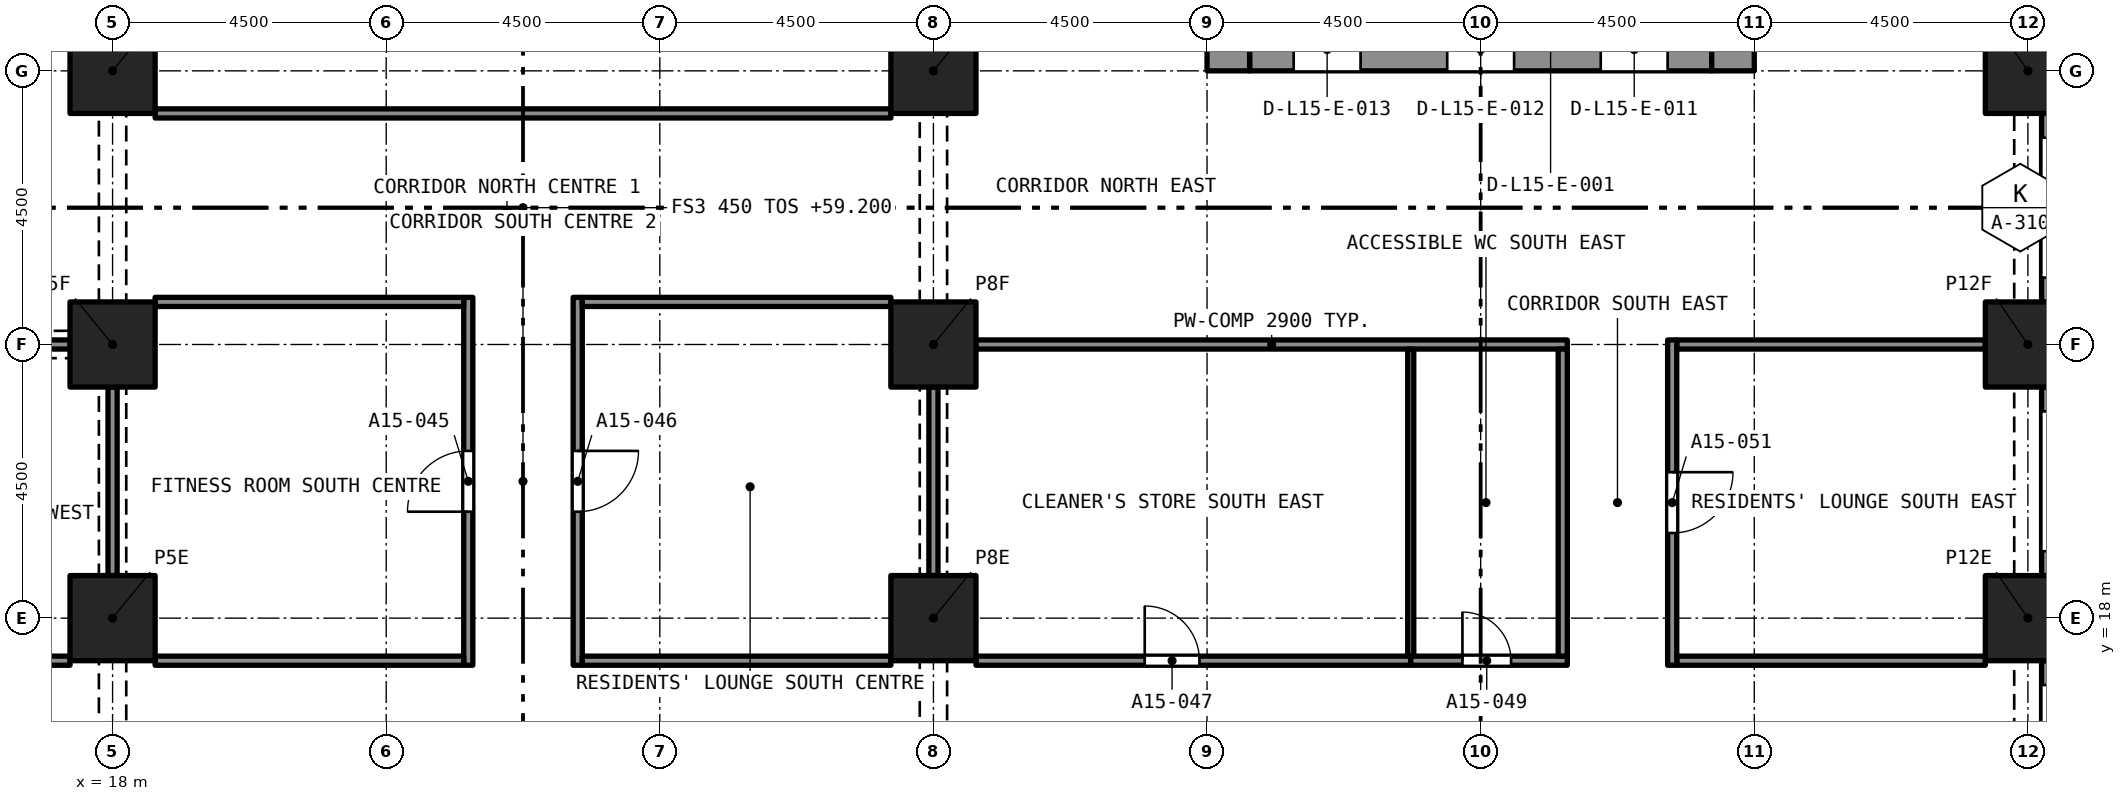
"""IFC4 building model, lengths in metres.
Left out: names, types, materials, properties, quantities, classifications, styles, units other than length and angle.
Written with IfcOpenShell. Run it as: python <this file> out.ifc"""

import sys

from ifc_helpers import new_model, si_unit, direction, frame, frame_2d, origin, origin_2d, place, context, subcontext, project, spatial, rectangle, extrude, element, fill, save


model = new_model("IFC4")
c1 = context("Model", 3, precision=1e-05, world=origin(), true_north=direction((0.0, 1.0)))
c2 = subcontext(c1, "Body", "Model", "MODEL_VIEW")
j1 = project(units=[si_unit("LENGTHUNIT", "METRE"), si_unit("PLANEANGLEUNIT", "RADIAN")], contexts=[c1])
p1 = place(None, origin())
s1 = spatial("IfcSite", under=j1, at=p1, CompositionType="ELEMENT")
p2 = place(p1, origin())
s2 = spatial("IfcBuilding", under=s1, at=p2, CompositionType="ELEMENT")
p3 = place(p2, frame((0.0, 0.0, 59.2)))
s3 = spatial("IfcBuildingStorey", under=s2, at=p3, CompositionType="ELEMENT", Elevation=59.2)
for number, where, z_axis, x_axis in (
    (1, (18.0, 18.0, 0.0), (0.0, 0.0, 1.0), (1.0, 0.0, 0.0)),
    (2, (31.5, 18.0, 0.0), (0.0, 0.0, 1.0), (1.0, 0.0, 0.0)),
    (3, (49.5, 18.0, 0.0), (0.0, 0.0, 1.0), (1.0, 0.0, 0.0)),
    (4, (18.0, 22.5, 0.0), (0.0, 0.0, 1.0), (1.0, 0.0, 0.0)),
    (5, (31.5, 22.5, 0.0), (0.0, 0.0, 1.0), (1.0, 0.0, 0.0)),
    (6, (49.5, 22.5, 0.0), (0.0, 0.0, 1.0), (1.0, 0.0, 0.0)),
    (7, (18.0, 27.0, 0.0), (0.0, 0.0, 1.0), (1.0, 0.0, 0.0)),
    (8, (31.5, 27.0, 0.0), (0.0, 0.0, 1.0), (1.0, 0.0, 0.0)),
    (9, (49.5, 27.0, 0.0), (0.0, 0.0, 1.0), (1.0, 0.0, 0.0)),
):
    element("IfcColumn", number, at=place(p3, frame(where, z_axis=z_axis, x_axis=x_axis)), inside=s3, PredefinedType="COLUMN", context=c2, shape_type="SweptSolid", body=[
        extrude(rectangle(XDim=1.4, YDim=1.4, at=origin_2d()), origin(), (0.0, 0.0, 1.0), 3.2),
    ])
p4 = place(p3, frame((36.7, 27.35, 0.0), z_axis=(0.0, 0.0, 1.0), x_axis=(1.0, 0.0, 0.0)))
e10 = element("IfcWall", 10, at=p4, inside=s3, PredefinedType="SOLIDWALL", context=c2, shape_type="SweptSolid", body=[
    extrude(rectangle(XDim=7.6, YDim=0.7, at=frame_2d((3.8, 0.0))), origin(), (0.0, 0.0, 1.0), 3.2),
])
p5 = place(p4, frame((5.775, 0.0, 0.0)))
e11 = element("IfcOpeningElement", 11, at=p5, cuts=e10, PredefinedType="OPENING", context=c2, shape_type="SweptSolid", body=[
    extrude(rectangle(XDim=1.1, YDim=2.1, at=frame_2d((0.55, 1.05))), frame((0.0, 0.36, 0.0), z_axis=(0.0, -1.0, 0.0), x_axis=(1.0, 0.0, 0.0)), (0.0, 0.0, 1.0), 0.72),
])
p6 = place(p4, frame((3.25, 0.0, 0.0)))
e12 = element("IfcOpeningElement", 12, at=p6, cuts=e10, PredefinedType="OPENING", context=c2, shape_type="SweptSolid", body=[
    extrude(rectangle(XDim=1.1, YDim=2.1, at=frame_2d((0.55, 1.05))), frame((0.0, 0.36, 0.0), z_axis=(0.0, -1.0, 0.0), x_axis=(1.0, 0.0, 0.0)), (0.0, 0.0, 1.0), 0.72),
])
p7 = place(p4, frame((0.725, 0.0, 0.0)))
e13 = element("IfcOpeningElement", 13, at=p7, cuts=e10, PredefinedType="OPENING", context=c2, shape_type="SweptSolid", body=[
    extrude(rectangle(XDim=1.1, YDim=2.1, at=frame_2d((0.55, 1.05))), frame((0.0, 0.36, 0.0), z_axis=(0.0, -1.0, 0.0), x_axis=(1.0, 0.0, 0.0)), (0.0, 0.0, 1.0), 0.72),
])
p8 = place(p3, frame((36.35, 27.0, 0.0), z_axis=(0.0, 0.0, 1.0), x_axis=(0.0, 1.0, 0.0)))
e14 = element("IfcWall", 14, at=p8, inside=s3, PredefinedType="SOLIDWALL", context=c2, shape_type="SweptSolid", body=[
    extrude(rectangle(XDim=13.5, YDim=0.7, at=frame_2d((6.75, 0.0))), origin(), (0.0, 0.0, 1.0), 3.2),
])
p9 = place(p8, frame((8.95, 0.0, 0.0)))
e15 = element("IfcOpeningElement", 15, at=p9, cuts=e14, PredefinedType="OPENING", context=c2, shape_type="SweptSolid", body=[
    extrude(rectangle(XDim=1.2, YDim=2.1, at=frame_2d((0.6, 1.05))), frame((0.0, 0.36, 0.0), z_axis=(0.0, -1.0, 0.0), x_axis=(1.0, 0.0, 0.0)), (0.0, 0.0, 1.0), 0.72),
])
p10 = place(p3, frame((44.65, 27.0, 0.0), z_axis=(0.0, 0.0, 1.0), x_axis=(0.0, 1.0, 0.0)))
e16 = element("IfcWall", 16, at=p10, inside=s3, PredefinedType="SOLIDWALL", context=c2, shape_type="SweptSolid", body=[
    extrude(rectangle(XDim=13.5, YDim=0.7, at=frame_2d((6.75, 0.0))), origin(), (0.0, 0.0, 1.0), 3.2),
])
p11 = place(p10, frame((8.95, 0.0, 0.0)))
e17 = element("IfcOpeningElement", 17, at=p11, cuts=e16, PredefinedType="OPENING", context=c2, shape_type="SweptSolid", body=[
    extrude(rectangle(XDim=1.2, YDim=2.1, at=frame_2d((0.6, 1.05))), frame((0.0, 0.36, 0.0), z_axis=(0.0, -1.0, 0.0), x_axis=(1.0, 0.0, 0.0)), (0.0, 0.0, 1.0), 0.72),
])
p12 = place(p3, frame((49.875, 17.3, 0.0), z_axis=(0.0, 0.0, 1.0), x_axis=(0.0, -1.0, 0.0)))
e18 = element("IfcWall", 18, at=p12, inside=s3, PredefinedType="SOLIDWALL", context=c2, shape_type="SweptSolid", body=[
    extrude(rectangle(XDim=3.1, YDim=0.3, at=frame_2d((1.55, 0.0))), origin(), (0.0, 0.0, 1.0), 3.2),
])
p13 = place(p12, frame((0.4, 0.0, 0.45)))
e19 = element("IfcOpeningElement", 19, at=p13, cuts=e18, PredefinedType="OPENING", context=c2, shape_type="SweptSolid", body=[
    extrude(rectangle(XDim=2.3, YDim=1.95, at=frame_2d((1.15, 0.975))), frame((0.0, 0.16, 0.0), z_axis=(0.0, -1.0, 0.0), x_axis=(1.0, 0.0, 0.0)), (0.0, 0.0, 1.0), 0.32),
])
p14 = place(p3, frame((49.875, 21.8, 0.0), z_axis=(0.0, 0.0, 1.0), x_axis=(0.0, -1.0, 0.0)))
e20 = element("IfcWall", 20, at=p14, inside=s3, PredefinedType="SOLIDWALL", context=c2, shape_type="SweptSolid", body=[
    extrude(rectangle(XDim=3.1, YDim=0.3, at=frame_2d((1.55, 0.0))), origin(), (0.0, 0.0, 1.0), 3.2),
])
p15 = place(p14, frame((0.4, 0.0, 0.45)))
e21 = element("IfcOpeningElement", 21, at=p15, cuts=e20, PredefinedType="OPENING", context=c2, shape_type="SweptSolid", body=[
    extrude(rectangle(XDim=2.3, YDim=1.95, at=frame_2d((1.15, 0.975))), frame((0.0, 0.16, 0.0), z_axis=(0.0, -1.0, 0.0), x_axis=(1.0, 0.0, 0.0)), (0.0, 0.0, 1.0), 0.32),
])
p16 = place(p3, frame((49.875, 26.3, 0.0), z_axis=(0.0, 0.0, 1.0), x_axis=(0.0, -1.0, 0.0)))
e22 = element("IfcWall", 22, at=p16, inside=s3, PredefinedType="SOLIDWALL", context=c2, shape_type="SweptSolid", body=[
    extrude(rectangle(XDim=3.1, YDim=0.3, at=frame_2d((1.55, 0.0))), origin(), (0.0, 0.0, 1.0), 3.2),
])
p17 = place(p16, frame((0.4, 0.0, 0.45)))
e23 = element("IfcOpeningElement", 23, at=p17, cuts=e22, PredefinedType="OPENING", context=c2, shape_type="SweptSolid", body=[
    extrude(rectangle(XDim=2.3, YDim=1.95, at=frame_2d((1.15, 0.975))), frame((0.0, 0.16, 0.0), z_axis=(0.0, -1.0, 0.0), x_axis=(1.0, 0.0, 0.0)), (0.0, 0.0, 1.0), 0.32),
])
p18 = place(p3, frame((23.85, 17.225, 0.0), z_axis=(0.0, 0.0, 1.0), x_axis=(0.0, 1.0, 0.0)))
e24 = element("IfcWall", 24, at=p18, inside=s3, PredefinedType="PARTITIONING", context=c2, shape_type="SweptSolid", body=[
    extrude(rectangle(XDim=6.05, YDim=0.15, at=frame_2d((3.025, 0.0))), origin(), (0.0, 0.0, 1.0), 2.75),
])
p19 = place(p18, frame((2.525, 0.0, 0.0)))
e25 = element("IfcOpeningElement", 25, at=p19, cuts=e24, PredefinedType="OPENING", context=c2, shape_type="SweptSolid", body=[
    extrude(rectangle(XDim=1.0, YDim=2.1, at=frame_2d((0.5, 1.05))), frame((0.0, 0.085, 0.0), z_axis=(0.0, -1.0, 0.0), x_axis=(1.0, 0.0, 0.0)), (0.0, 0.0, 1.0), 0.17),
])
p20 = place(p3, frame((25.65, 23.275, 0.0), z_axis=(0.0, 0.0, 1.0), x_axis=(0.0, -1.0, 0.0)))
e26 = element("IfcWall", 26, at=p20, inside=s3, PredefinedType="PARTITIONING", context=c2, shape_type="SweptSolid", body=[
    extrude(rectangle(XDim=6.05, YDim=0.15, at=frame_2d((3.025, 0.0))), origin(), (0.0, 0.0, 1.0), 2.75),
])
p21 = place(p20, frame((2.525, 0.0, 0.0)))
e27 = element("IfcOpeningElement", 27, at=p21, cuts=e26, PredefinedType="OPENING", context=c2, shape_type="SweptSolid", body=[
    extrude(rectangle(XDim=1.0, YDim=2.1, at=frame_2d((0.5, 1.05))), frame((0.0, 0.085, 0.0), z_axis=(0.0, -1.0, 0.0), x_axis=(1.0, 0.0, 0.0)), (0.0, 0.0, 1.0), 0.17),
])
for number, where, z_axis, x_axis in (
    (28, (18.7, 17.3, 0.0), (0.0, 0.0, 1.0), (1.0, 0.0, 0.0)),
    (29, (25.725, 17.3, 0.0), (0.0, 0.0, 1.0), (1.0, 0.0, 0.0)),
):
    element("IfcWall", number, at=place(p3, frame(where, z_axis=z_axis, x_axis=x_axis)), inside=s3, PredefinedType="PARTITIONING", context=c2, shape_type="SweptSolid", body=[
        extrude(rectangle(XDim=5.075, YDim=0.15, at=frame_2d((2.538, 0.0))), origin(), (0.0, 0.0, 1.0), 2.75),
    ])
p22 = place(p3, frame((32.2, 17.3, 0.0), z_axis=(0.0, 0.0, 1.0), x_axis=(1.0, 0.0, 0.0)))
e30 = element("IfcWall", 30, at=p22, inside=s3, PredefinedType="PARTITIONING", context=c2, shape_type="SweptSolid", body=[
    extrude(rectangle(XDim=7.15, YDim=0.15, at=frame_2d((3.575, 0.0))), origin(), (0.0, 0.0, 1.0), 2.9),
])
p23 = place(p22, frame((2.775, 0.0, 0.0)))
e31 = element("IfcOpeningElement", 31, at=p23, cuts=e30, PredefinedType="OPENING", context=c2, shape_type="SweptSolid", body=[
    extrude(rectangle(XDim=0.9, YDim=2.1, at=frame_2d((0.45, 1.05))), frame((0.0, 0.085, 0.0), z_axis=(0.0, -1.0, 0.0), x_axis=(1.0, 0.0, 0.0)), (0.0, 0.0, 1.0), 0.17),
])
p24 = place(p3, frame((10.15, 17.3, 0.0), z_axis=(0.0, 0.0, 1.0), x_axis=(1.0, 0.0, 0.0)))
e32 = element("IfcWall", 32, at=p24, inside=s3, PredefinedType="PARTITIONING", context=c2, shape_type="SweptSolid", body=[
    extrude(rectangle(XDim=7.15, YDim=0.15, at=frame_2d((3.575, 0.0))), origin(), (0.0, 0.0, 1.0), 2.9),
])
p25 = place(p24, frame((3.475, 0.0, 0.0)))
e33 = element("IfcOpeningElement", 33, at=p25, cuts=e32, PredefinedType="OPENING", context=c2, shape_type="SweptSolid", body=[
    extrude(rectangle(XDim=0.9, YDim=2.1, at=frame_2d((0.45, 1.05))), frame((0.0, 0.085, 0.0), z_axis=(0.0, -1.0, 0.0), x_axis=(1.0, 0.0, 0.0)), (0.0, 0.0, 1.0), 0.17),
])
p26 = place(p3, frame((39.35, 17.3, 0.0), z_axis=(0.0, 0.0, 1.0), x_axis=(1.0, 0.0, 0.0)))
e34 = element("IfcWall", 34, at=p26, inside=s3, PredefinedType="PARTITIONING", context=c2, shape_type="SweptSolid", body=[
    extrude(rectangle(XDim=2.575, YDim=0.15, at=frame_2d((1.288, 0.0))), origin(), (0.0, 0.0, 1.0), 2.9),
])
p27 = place(p26, frame((0.85, 0.0, 0.0)))
e35 = element("IfcOpeningElement", 35, at=p27, cuts=e34, PredefinedType="OPENING", context=c2, shape_type="SweptSolid", body=[
    extrude(rectangle(XDim=0.8, YDim=2.1, at=frame_2d((0.4, 1.05))), frame((0.0, 0.085, 0.0), z_axis=(0.0, -1.0, 0.0), x_axis=(1.0, 0.0, 0.0)), (0.0, 0.0, 1.0), 0.17),
])
p28 = place(p3, frame((43.725, 17.3, 0.0), z_axis=(0.0, 0.0, 1.0), x_axis=(1.0, 0.0, 0.0)))
e36 = element("IfcWall", 36, at=p28, inside=s3, PredefinedType="PARTITIONING", context=c2, shape_type="SweptSolid", body=[
    extrude(rectangle(XDim=5.075, YDim=0.15, at=frame_2d((2.538, 0.0))), origin(), (0.0, 0.0, 1.0), 2.9),
])
p29 = place(p3, frame((18.7, 26.3, 0.0), z_axis=(0.0, 0.0, 1.0), x_axis=(1.0, 0.0, 0.0)))
e37 = element("IfcWall", 37, at=p29, inside=s3, PredefinedType="PARTITIONING", context=c2, shape_type="SweptSolid", body=[
    extrude(rectangle(XDim=12.1, YDim=0.15, at=frame_2d((6.05, 0.0))), origin(), (0.0, 0.0, 1.0), 2.75),
])
p30 = place(p3, frame((18.7, 23.2, 0.0), z_axis=(0.0, 0.0, 1.0), x_axis=(1.0, 0.0, 0.0)))
e38 = element("IfcWall", 38, at=p30, inside=s3, PredefinedType="PARTITIONING", context=c2, shape_type="SweptSolid", body=[
    extrude(rectangle(XDim=5.075, YDim=0.15, at=frame_2d((2.538, 0.0))), origin(), (0.0, 0.0, 1.0), 2.75),
])
p31 = place(p3, frame((18.0, 18.7, 0.0), z_axis=(0.0, 0.0, 1.0), x_axis=(0.0, 1.0, 0.0)))
e39 = element("IfcWall", 39, at=p31, inside=s3, PredefinedType="PARTITIONING", context=c2, shape_type="SweptSolid", body=[
    extrude(rectangle(XDim=3.1, YDim=0.15, at=frame_2d((1.55, 0.0))), origin(), (0.0, 0.0, 1.0), 2.38),
])
p32 = place(p3, frame((25.725, 23.2, 0.0), z_axis=(0.0, 0.0, 1.0), x_axis=(1.0, 0.0, 0.0)))
e40 = element("IfcWall", 40, at=p32, inside=s3, PredefinedType="PARTITIONING", context=c2, shape_type="SweptSolid", body=[
    extrude(rectangle(XDim=5.075, YDim=0.15, at=frame_2d((2.538, 0.0))), origin(), (0.0, 0.0, 1.0), 2.75),
])
p33 = place(p3, frame((31.5, 18.7, 0.0), z_axis=(0.0, 0.0, 1.0), x_axis=(0.0, 1.0, 0.0)))
e41 = element("IfcWall", 41, at=p33, inside=s3, PredefinedType="PARTITIONING", context=c2, shape_type="SweptSolid", body=[
    extrude(rectangle(XDim=3.1, YDim=0.15, at=frame_2d((1.55, 0.0))), origin(), (0.0, 0.0, 1.0), 2.38),
])
p34 = place(p3, frame((32.2, 22.5, 0.0), z_axis=(0.0, 0.0, 1.0), x_axis=(1.0, 0.0, 0.0)))
e42 = element("IfcWall", 42, at=p34, inside=s3, PredefinedType="PARTITIONING", context=c2, shape_type="SweptSolid", body=[
    extrude(rectangle(XDim=9.725, YDim=0.15, at=frame_2d((4.863, 0.0))), origin(), (0.0, 0.0, 1.0), 2.9),
])
p35 = place(p3, frame((43.725, 22.5, 0.0), z_axis=(0.0, 0.0, 1.0), x_axis=(1.0, 0.0, 0.0)))
e43 = element("IfcWall", 43, at=p35, inside=s3, PredefinedType="PARTITIONING", context=c2, shape_type="SweptSolid", body=[
    extrude(rectangle(XDim=5.075, YDim=0.15, at=frame_2d((2.538, 0.0))), origin(), (0.0, 0.0, 1.0), 2.9),
])
p36 = place(p3, frame((14.2, 22.5, 0.0), z_axis=(0.0, 0.0, 1.0), x_axis=(1.0, 0.0, 0.0)))
e44 = element("IfcWall", 44, at=p36, inside=s3, PredefinedType="PARTITIONING", context=c2, shape_type="SweptSolid", body=[
    extrude(rectangle(XDim=3.1, YDim=0.15, at=frame_2d((1.55, 0.0))), origin(), (0.0, 0.0, 1.0), 2.38),
])
p37 = place(p3, frame((41.85, 17.375, 0.0), z_axis=(0.0, 0.0, 1.0), x_axis=(0.0, 1.0, 0.0)))
e45 = element("IfcWall", 45, at=p37, inside=s3, PredefinedType="PARTITIONING", context=c2, shape_type="SweptSolid", body=[
    extrude(rectangle(XDim=5.05, YDim=0.15, at=frame_2d((2.525, 0.0))), origin(), (0.0, 0.0, 1.0), 2.9),
])
p38 = place(p3, frame((43.65, 22.575, 0.0), z_axis=(0.0, 0.0, 1.0), x_axis=(0.0, -1.0, 0.0)))
e46 = element("IfcWall", 46, at=p38, inside=s3, PredefinedType="PARTITIONING", context=c2, shape_type="SweptSolid", body=[
    extrude(rectangle(XDim=5.35, YDim=0.15, at=frame_2d((2.675, 0.0))), origin(), (0.0, 0.0, 1.0), 2.9),
])
p39 = place(p38, frame((2.175, 0.0, 0.0)))
e47 = element("IfcOpeningElement", 47, at=p39, cuts=e46, PredefinedType="OPENING", context=c2, shape_type="SweptSolid", body=[
    extrude(rectangle(XDim=1.0, YDim=2.1, at=frame_2d((0.5, 1.05))), frame((0.0, 0.085, 0.0), z_axis=(0.0, -1.0, 0.0), x_axis=(1.0, 0.0, 0.0)), (0.0, 0.0, 1.0), 0.17),
])
p40 = place(p3, frame((39.35, 17.375, 0.0), z_axis=(0.0, 0.0, 1.0), x_axis=(0.0, 1.0, 0.0)))
e48 = element("IfcWall", 48, at=p40, inside=s3, PredefinedType="PARTITIONING", context=c2, shape_type="SweptSolid", body=[
    extrude(rectangle(XDim=5.05, YDim=0.1, at=frame_2d((2.525, 0.0))), origin(), (0.0, 0.0, 1.0), 2.9),
])
p41 = place(p19, origin())
e49 = element("IfcDoor", 49, at=p41, inside=s3, OperationType="SINGLE_SWING_RIGHT", PredefinedType="DOOR", context=c2, shape_type="SweptSolid", body=[
    extrude(rectangle(XDim=1.0, YDim=2.1, at=frame_2d((0.5, 1.05))), frame((0.0, 0.025, 0.0), z_axis=(0.0, -1.0, 0.0), x_axis=(1.0, 0.0, 0.0)), (0.0, 0.0, 1.0), 0.05),
])
fill(e25, e49)
p42 = place(p21, origin())
e50 = element("IfcDoor", 50, at=p42, inside=s3, OperationType="SINGLE_SWING_RIGHT", PredefinedType="DOOR", context=c2, shape_type="SweptSolid", body=[
    extrude(rectangle(XDim=1.0, YDim=2.1, at=frame_2d((0.5, 1.05))), frame((0.0, 0.025, 0.0), z_axis=(0.0, -1.0, 0.0), x_axis=(1.0, 0.0, 0.0)), (0.0, 0.0, 1.0), 0.05),
])
fill(e27, e50)
p43 = place(p23, origin())
e51 = element("IfcDoor", 51, at=p43, inside=s3, OperationType="SINGLE_SWING_LEFT", PredefinedType="DOOR", context=c2, shape_type="SweptSolid", body=[
    extrude(rectangle(XDim=0.9, YDim=2.1, at=frame_2d((0.45, 1.05))), frame((0.0, 0.025, 0.0), z_axis=(0.0, -1.0, 0.0), x_axis=(1.0, 0.0, 0.0)), (0.0, 0.0, 1.0), 0.05),
])
fill(e31, e51)
p44 = place(p27, origin())
e52 = element("IfcDoor", 52, at=p44, inside=s3, OperationType="SINGLE_SWING_LEFT", PredefinedType="DOOR", context=c2, shape_type="SweptSolid", body=[
    extrude(rectangle(XDim=0.8, YDim=2.1, at=frame_2d((0.4, 1.05))), frame((0.0, 0.025, 0.0), z_axis=(0.0, -1.0, 0.0), x_axis=(1.0, 0.0, 0.0)), (0.0, 0.0, 1.0), 0.05),
])
fill(e35, e52)
p45 = place(p39, origin())
e53 = element("IfcDoor", 53, at=p45, inside=s3, OperationType="SINGLE_SWING_RIGHT", PredefinedType="DOOR", context=c2, shape_type="SweptSolid", body=[
    extrude(rectangle(XDim=1.0, YDim=2.1, at=frame_2d((0.5, 1.05))), frame((0.0, 0.025, 0.0), z_axis=(0.0, -1.0, 0.0), x_axis=(1.0, 0.0, 0.0)), (0.0, 0.0, 1.0), 0.05),
])
fill(e47, e53)
save(model, sys.argv[1])
